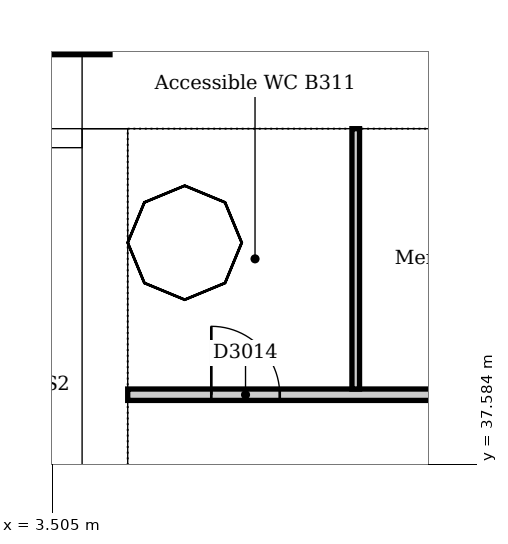
"""IFC4 building model, lengths in metres.
Left out: names, types, materials, properties, quantities, classifications, styles, units other than length and angle.
Written with IfcOpenShell. Run it as: python <this file> out.ifc"""

import sys

from ifc_helpers import new_model, si_unit, direction, frame, frame_2d, origin, origin_2d, place, context, subcontext, project, spatial, rectangle, extrude, element, fill, save


model = new_model("IFC4")
c1 = context("Model", 3, precision=1e-05, world=origin(), true_north=direction((0.0, 1.0)))
c2 = subcontext(c1, "Body", "Model", "MODEL_VIEW")
j1 = project(units=[si_unit("LENGTHUNIT", "METRE"), si_unit("PLANEANGLEUNIT", "RADIAN")], contexts=[c1])
p1 = place(None, origin())
s1 = spatial("IfcSite", under=j1, at=p1, CompositionType="ELEMENT")
p2 = place(p1, origin())
s2 = spatial("IfcBuilding", under=s1, at=p2, CompositionType="ELEMENT")
p3 = place(p2, frame((0.0, 0.0, -14.0)))
s3 = spatial("IfcBuildingStorey", under=s2, at=p3, CompositionType="ELEMENT", Elevation=-14.0)
p4 = place(p3, frame((23.7, 42.6, 0.0), z_axis=(0.0, 0.0, 1.0), x_axis=(-1.0, 0.0, 0.0)))
e1 = element("IfcWall", 1, at=p4, inside=s3, PredefinedType="SOLIDWALL", context=c2, shape_type="SweptSolid", body=[
    extrude(rectangle(XDim=19.8, YDim=1.2, at=frame_2d((9.9, 0.0))), origin(), (0.0, 0.0, 1.0), 4.5),
])
p5 = place(p3, frame((4.2, 42.0, 0.0), z_axis=(0.0, 0.0, 1.0), x_axis=(0.0, -1.0, 0.0)))
e2 = element("IfcWall", 2, at=p5, inside=s3, PredefinedType="SOLIDWALL", context=c2, shape_type="SweptSolid", body=[
    extrude(rectangle(XDim=10.5, YDim=0.6, at=frame_2d((5.25, 0.0))), origin(), (0.0, 0.0, 1.0), 4.5),
])
p6 = place(p3, frame((3.9, 41.875, 0.0), z_axis=(0.0, 0.0, 1.0), x_axis=(-1.0, 0.0, 0.0)))
e3 = element("IfcWall", 3, at=p6, inside=s3, PredefinedType="SOLIDWALL", context=c2, shape_type="SweptSolid", body=[
    extrude(rectangle(XDim=3.54, YDim=0.25, at=frame_2d((1.77, 0.0))), origin(), (0.0, 0.0, 1.0), 4.5),
])
p7 = place(p3, frame((3.667, 43.574, 0.0), z_axis=(0.0, 0.0, 1.0), x_axis=(1.0, 0.0, 0.0)))
e4 = element("IfcColumn", 4, at=p7, inside=s3, PredefinedType="COLUMN", context=c2, shape_type="SweptSolid", body=[
    extrude(rectangle(XDim=1.2, YDim=1.2, at=origin_2d()), origin(), (0.0, 0.0, 1.0), 4.15),
])
p8 = place(p3, frame((4.5, 38.5, 0.0), z_axis=(0.0, 0.0, 1.0), x_axis=(1.0, 0.0, 0.0)))
e5 = element("IfcWall", 5, at=p8, inside=s3, PredefinedType="PARTITIONING", context=c2, shape_type="SweptSolid", body=[
    extrude(rectangle(XDim=11.9, YDim=0.15, at=frame_2d((5.95, 0.0))), origin(), (0.0, 0.0, 1.0), 4.15),
])
p9 = place(p8, frame((1.1, 0.0, 0.0)))
e6 = element("IfcOpeningElement", 6, at=p9, cuts=e5, PredefinedType="OPENING", context=c2, shape_type="SweptSolid", body=[
    extrude(rectangle(XDim=0.9, YDim=2.1, at=frame_2d((0.45, 1.05))), frame((0.0, 0.085, 0.0), z_axis=(0.0, -1.0, 0.0), x_axis=(1.0, 0.0, 0.0)), (0.0, 0.0, 1.0), 0.17),
])
p10 = place(p8, frame((4.05, 0.0, 0.0)))
e7 = element("IfcOpeningElement", 7, at=p10, cuts=e5, PredefinedType="OPENING", context=c2, shape_type="SweptSolid", body=[
    extrude(rectangle(XDim=0.9, YDim=2.1, at=frame_2d((0.45, 1.05))), frame((0.0, 0.085, 0.0), z_axis=(0.0, -1.0, 0.0), x_axis=(1.0, 0.0, 0.0)), (0.0, 0.0, 1.0), 0.17),
])
p11 = place(p8, frame((7.05, 0.0, 0.0)))
e8 = element("IfcOpeningElement", 8, at=p11, cuts=e5, PredefinedType="OPENING", context=c2, shape_type="SweptSolid", body=[
    extrude(rectangle(XDim=0.9, YDim=2.1, at=frame_2d((0.45, 1.05))), frame((0.0, 0.085, 0.0), z_axis=(0.0, -1.0, 0.0), x_axis=(1.0, 0.0, 0.0)), (0.0, 0.0, 1.0), 0.17),
])
p12 = place(p8, frame((9.95, 0.0, 0.0)))
e9 = element("IfcOpeningElement", 9, at=p12, cuts=e5, PredefinedType="OPENING", context=c2, shape_type="SweptSolid", body=[
    extrude(rectangle(XDim=0.8, YDim=2.1, at=frame_2d((0.4, 1.05))), frame((0.0, 0.085, 0.0), z_axis=(0.0, -1.0, 0.0), x_axis=(1.0, 0.0, 0.0)), (0.0, 0.0, 1.0), 0.17),
])
p13 = place(p3, frame((7.5, 38.575, 0.0), z_axis=(0.0, 0.0, 1.0), x_axis=(0.0, 1.0, 0.0)))
e10 = element("IfcWall", 10, at=p13, inside=s3, PredefinedType="PARTITIONING", context=c2, shape_type="SweptSolid", body=[
    extrude(rectangle(XDim=3.425, YDim=0.1, at=frame_2d((1.712, 0.0))), origin(), (0.0, 0.0, 1.0), 4.15),
])
p14 = place(p9, origin())
e11 = element("IfcDoor", 11, at=p14, inside=s3, OperationType="SINGLE_SWING_LEFT", PredefinedType="DOOR", context=c2, shape_type="SweptSolid", body=[
    extrude(rectangle(XDim=0.9, YDim=2.1, at=frame_2d((0.45, 1.05))), frame((0.0, 0.025, 0.0), z_axis=(0.0, -1.0, 0.0), x_axis=(1.0, 0.0, 0.0)), (0.0, 0.0, 1.0), 0.05),
])
fill(e6, e11)
save(model, sys.argv[1])
